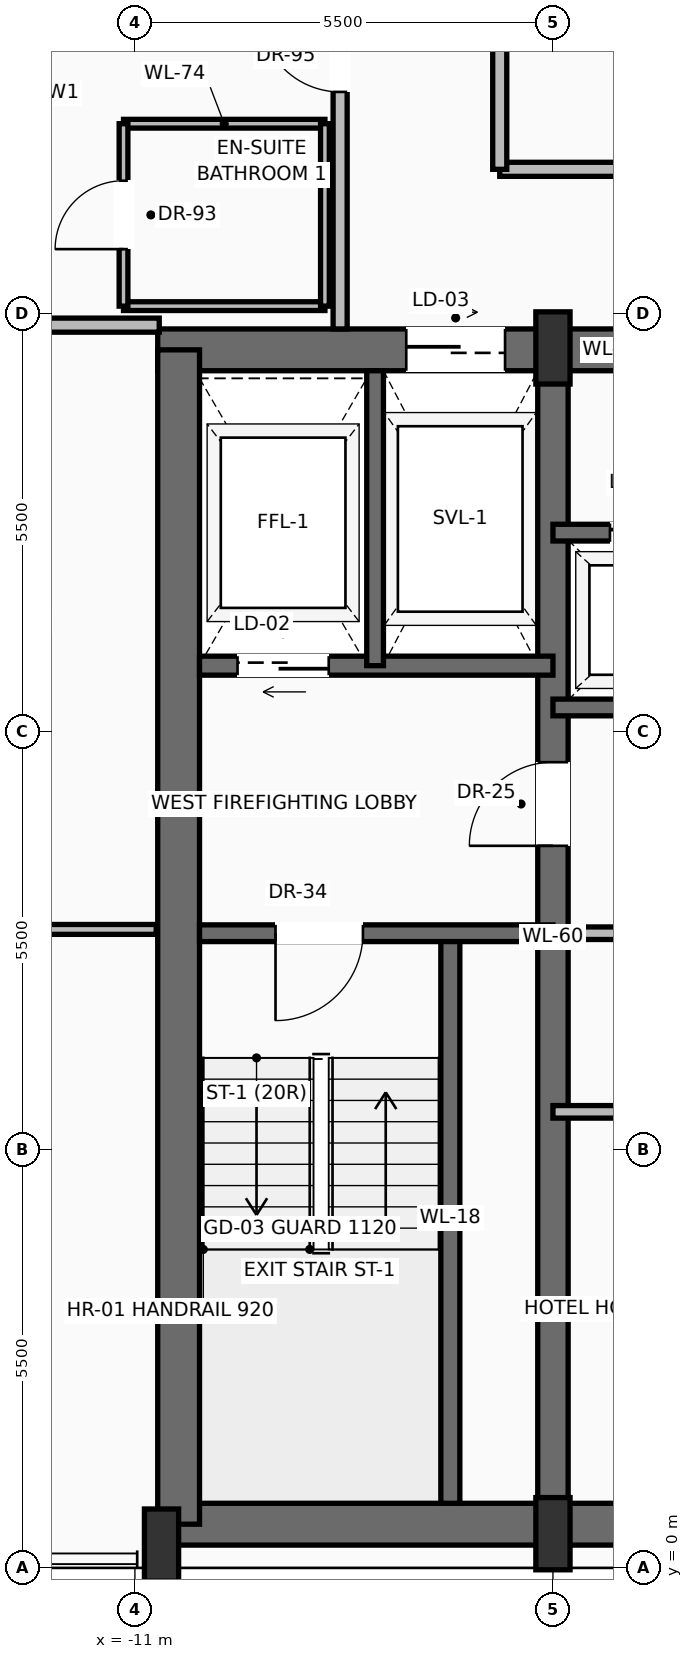
"""IFC4 building model, lengths in metres.
Left out: names, types, materials, properties, quantities, classifications, styles, units other than length and angle.
Written with IfcOpenShell. Run it as: python <this file> out.ifc"""

import sys

from ifc_helpers import new_model, si_unit, direction, frame, frame_2d, origin, origin_2d, place, context, subcontext, project, spatial, rectangle, extrude, source, transform, mapped, element, fill, save


model = new_model("IFC4")
c1 = context("Model", 3, precision=1e-05, world=origin(), true_north=direction((0.0, 1.0)))
c2 = subcontext(c1, "Body", "Model", "MODEL_VIEW")
j1 = project(units=[si_unit("LENGTHUNIT", "METRE"), si_unit("PLANEANGLEUNIT", "RADIAN")], contexts=[c1])
p1 = place(None, origin())
s1 = spatial("IfcSite", under=j1, at=p1, CompositionType="ELEMENT")
p2 = place(p1, origin())
s2 = spatial("IfcBuilding", under=s1, at=p2, CompositionType="ELEMENT")
p3 = place(p2, frame((0.0, 0.0, 251.05)))
s3 = spatial("IfcBuildingStorey", under=s2, at=p3, CompositionType="ELEMENT", Elevation=251.05)
p4 = place(p3, frame((-10.65, 0.575, 0.0), z_axis=(0.0, 0.0, 1.0), x_axis=(1.0, 0.0, 0.0)))
e1 = element("IfcWall", 1, at=p4, inside=s3, PredefinedType="SHEAR", context=c2, shape_type="SweptSolid", body=[
    extrude(rectangle(XDim=21.3, YDim=0.55, at=frame_2d((10.65, 0.0))), origin(), (0.0, 0.0, 1.0), 3.24),
])
p5 = place(p3, frame((-10.7, 16.025, 0.0), z_axis=(0.0, 0.0, 1.0), x_axis=(1.0, 0.0, 0.0)))
e2 = element("IfcWall", 2, at=p5, inside=s3, PredefinedType="SHEAR", context=c2, shape_type="SweptSolid", body=[
    extrude(rectangle(XDim=21.4, YDim=0.55, at=frame_2d((10.7, 0.0))), origin(), (0.0, 0.0, 1.0), 3.24),
])
p6 = place(p5, frame((3.27, 0.0, 0.0)))
e3 = element("IfcOpeningElement", 3, at=p6, cuts=e2, PredefinedType="OPENING", context=c2, shape_type="SweptSolid", body=[
    extrude(rectangle(XDim=1.3, YDim=2.3, at=frame_2d((0.65, 1.15))), frame((0.0, 0.285, 0.0), z_axis=(0.0, -1.0, 0.0), x_axis=(1.0, 0.0, 0.0)), (0.0, 0.0, 1.0), 0.57),
])
p7 = place(p5, frame((9.7, 0.0, 0.0)))
e4 = element("IfcOpeningElement", 4, at=p7, cuts=e2, PredefinedType="OPENING", context=c2, shape_type="SweptSolid", body=[
    extrude(rectangle(XDim=2.0, YDim=2.4, at=frame_2d((1.0, 1.2))), frame((0.0, 0.285, 0.0), z_axis=(0.0, -1.0, 0.0), x_axis=(1.0, 0.0, 0.0)), (0.0, 0.0, 1.0), 0.57),
])
p8 = place(p3, frame((-10.425, 0.575, 0.0), z_axis=(0.0, 0.0, 1.0), x_axis=(0.0, 1.0, 0.0)))
e5 = element("IfcWall", 5, at=p8, inside=s3, PredefinedType="SHEAR", context=c2, shape_type="SweptSolid", body=[
    extrude(rectangle(XDim=15.45, YDim=0.55, at=frame_2d((7.725, 0.0))), origin(), (0.0, 0.0, 1.0), 3.24),
])
p9 = place(p3, frame((-5.5, 0.575, 0.0), z_axis=(0.0, 0.0, 1.0), x_axis=(0.0, 1.0, 0.0)))
e6 = element("IfcWall", 6, at=p9, inside=s3, PredefinedType="SHEAR", context=c2, shape_type="SweptSolid", body=[
    extrude(rectangle(XDim=15.45, YDim=0.4, at=frame_2d((7.725, 0.0))), origin(), (0.0, 0.0, 1.0), 3.24),
])
p10 = place(p9, frame((8.925, 0.0, 0.0)))
e7 = element("IfcOpeningElement", 7, at=p10, cuts=e6, PredefinedType="OPENING", context=c2, shape_type="SweptSolid", body=[
    extrude(rectangle(XDim=1.1, YDim=2.2, at=frame_2d((0.55, 1.1))), frame((0.0, 0.21, 0.0), z_axis=(0.0, -1.0, 0.0), x_axis=(1.0, 0.0, 0.0)), (0.0, 0.0, 1.0), 0.42),
])
m1 = source(origin(), c2, "Body", "SweptSolid", [
    extrude(rectangle(XDim=0.45, YDim=0.95, at=origin_2d()), origin(), (0.0, 0.0, 1.0), 3.45),
])
for number, where, z_axis, x_axis in (
    (8, (-10.65, 0.3, 0.0), (0.0, 0.0, 1.0), (1.0, 0.0, 0.0)),
    (9, (-5.5, 0.45, 0.0), (0.0, 0.0, 1.0), (1.0, 0.0, 0.0)),
    (10, (-5.5, 16.05, 0.0), (0.0, 0.0, 1.0), (1.0, 0.0, 0.0)),
):
    element("IfcColumn", number, at=place(p3, frame(where, z_axis=z_axis, x_axis=x_axis)), inside=s3, PredefinedType="PILASTER", context=c2, shape_type="MappedRepresentation", body=[
        mapped(m1, transform((0.0, 0.0, 0.0), scale=1.0)),
    ])
p11 = place(p3, frame((-19.099, 14.814, 0.0), z_axis=(0.0, 0.0, 1.0), x_axis=(0.505023562938, 0.863105556046, 0.0)))
e11 = element("IfcWall", 11, at=p11, inside=s3, PredefinedType="SOLIDWALL", context=c2, shape_type="SweptSolid", body=[
    extrude(rectangle(XDim=19.748, YDim=0.28, at=frame_2d((9.874, 0.0))), origin(), (0.0, 0.0, 1.0), 2.82),
])
p12 = place(p11, frame((4.74, 0.0, 0.0)))
e12 = element("IfcOpeningElement", 12, at=p12, cuts=e11, PredefinedType="OPENING", context=c2, shape_type="SweptSolid", body=[
    extrude(rectangle(XDim=1.6, YDim=2.35, at=frame_2d((0.8, 1.175))), frame((0.0, 0.15, 0.0), z_axis=(0.0, -1.0, 0.0), x_axis=(1.0, 0.0, 0.0)), (0.0, 0.0, 1.0), 0.3),
])
p13 = place(p11, frame((13.429, 0.0, 0.9)))
e13 = element("IfcOpeningElement", 13, at=p13, cuts=e11, PredefinedType="OPENING", context=c2, shape_type="SweptSolid", body=[
    extrude(rectangle(XDim=1.55, YDim=1.75, at=frame_2d((0.775, 0.875))), frame((0.0, 0.15, 0.0), z_axis=(0.0, -1.0, 0.0), x_axis=(1.0, 0.0, 0.0)), (0.0, 0.0, 1.0), 0.3),
])
p14 = place(p3, frame((-6.85, 0.85, 0.0), z_axis=(0.0, 0.0, 1.0), x_axis=(0.0, 1.0, 0.0)))
e14 = element("IfcWall", 14, at=p14, inside=s3, PredefinedType="SOLIDWALL", context=c2, shape_type="SweptSolid", body=[
    extrude(rectangle(XDim=7.5, YDim=0.25, at=frame_2d((3.75, 0.0))), origin(), (0.0, 0.0, 1.0), 3.24),
])
p15 = place(p3, frame((-5.5, 8.35, 0.0), z_axis=(0.0, 0.0, 1.0), x_axis=(-1.0, 0.0, 0.0)))
e15 = element("IfcWall", 15, at=p15, inside=s3, PredefinedType="SOLIDWALL", context=c2, shape_type="SweptSolid", body=[
    extrude(rectangle(XDim=4.65, YDim=0.22, at=frame_2d((2.325, 0.0))), origin(), (0.0, 0.0, 1.0), 3.24),
])
p16 = place(p15, frame((2.5, 0.0, 0.0)))
e16 = element("IfcOpeningElement", 16, at=p16, cuts=e15, PredefinedType="OPENING", context=c2, shape_type="SweptSolid", body=[
    extrude(rectangle(XDim=1.15, YDim=2.2, at=frame_2d((0.575, 1.1))), frame((0.0, 0.12, 0.0), z_axis=(0.0, -1.0, 0.0), x_axis=(1.0, 0.0, 0.0)), (0.0, 0.0, 1.0), 0.24),
])
p17 = place(p3, frame((-5.5, 11.87, 0.0), z_axis=(0.0, 0.0, 1.0), x_axis=(-1.0, 0.0, 0.0)))
e17 = element("IfcWall", 17, at=p17, inside=s3, PredefinedType="SOLIDWALL", context=c2, shape_type="SweptSolid", body=[
    extrude(rectangle(XDim=4.65, YDim=0.25, at=frame_2d((2.325, 0.0))), origin(), (0.0, 0.0, 1.0), 3.24),
])
p18 = place(p17, frame((2.95, 0.0, 0.0)))
e18 = element("IfcOpeningElement", 18, at=p18, cuts=e17, PredefinedType="OPENING", context=c2, shape_type="SweptSolid", body=[
    extrude(rectangle(XDim=1.2, YDim=2.25, at=frame_2d((0.6, 1.125))), frame((0.0, 0.135, 0.0), z_axis=(0.0, -1.0, 0.0), x_axis=(1.0, 0.0, 0.0)), (0.0, 0.0, 1.0), 0.27),
])
p19 = place(p3, frame((-7.84, 11.87, 0.0), z_axis=(0.0, 0.0, 1.0), x_axis=(0.0, 1.0, 0.0)))
e19 = element("IfcWall", 19, at=p19, inside=s3, PredefinedType="SOLIDWALL", context=c2, shape_type="SweptSolid", body=[
    extrude(rectangle(XDim=3.88, YDim=0.22, at=frame_2d((1.94, 0.0))), origin(), (0.0, 0.0, 1.0), 3.24),
])
p20 = place(p3, frame((-5.5, 6.0, 0.0), z_axis=(0.0, 0.0, 1.0), x_axis=(1.0, 0.0, 0.0)))
e20 = element("IfcWall", 20, at=p20, inside=s3, PredefinedType="PARTITIONING", context=c2, shape_type="SweptSolid", body=[
    extrude(rectangle(XDim=10.8, YDim=0.165, at=frame_2d((5.4, 0.0))), origin(), (0.0, 0.0, 1.0), 3.232),
])
p21 = place(p20, frame((7.7, 0.0, 0.0)))
e21 = element("IfcOpeningElement", 21, at=p21, cuts=e20, PredefinedType="OPENING", context=c2, shape_type="SweptSolid", body=[
    extrude(rectangle(XDim=0.9, YDim=2.1, at=frame_2d((0.45, 1.05))), frame((0.0, 0.093, 0.0), z_axis=(0.0, -1.0, 0.0), x_axis=(1.0, 0.0, 0.0)), (0.0, 0.0, 1.0), 0.185),
])
p22 = place(p3, frame((-5.3, 8.35, 0.0), z_axis=(0.0, 0.0, 1.0), x_axis=(1.0, 0.0, 0.0)))
e22 = element("IfcWall", 22, at=p22, inside=s3, PredefinedType="PARTITIONING", context=c2, shape_type="SweptSolid", body=[
    extrude(rectangle(XDim=7.12, YDim=0.165, at=frame_2d((3.56, 0.0))), origin(), (0.0, 0.0, 1.0), 3.232),
])
p23 = place(p22, frame((0.85, 0.0, 0.0)))
e23 = element("IfcOpeningElement", 23, at=p23, cuts=e22, PredefinedType="OPENING", context=c2, shape_type="SweptSolid", body=[
    extrude(rectangle(XDim=0.9, YDim=2.1, at=frame_2d((0.45, 1.05))), frame((0.0, 0.093, 0.0), z_axis=(0.0, -1.0, 0.0), x_axis=(1.0, 0.0, 0.0)), (0.0, 0.0, 1.0), 0.185),
])
p24 = place(p22, frame((5.65, 0.0, 0.0)))
e24 = element("IfcOpeningElement", 24, at=p24, cuts=e22, PredefinedType="OPENING", context=c2, shape_type="SweptSolid", body=[
    extrude(rectangle(XDim=0.9, YDim=2.1, at=frame_2d((0.45, 1.05))), frame((0.0, 0.093, 0.0), z_axis=(0.0, -1.0, 0.0), x_axis=(1.0, 0.0, 0.0)), (0.0, 0.0, 1.0), 0.185),
])
p25 = place(p3, frame((-5.5, 11.32, 0.0), z_axis=(0.0, 0.0, 1.0), x_axis=(1.0, 0.0, 0.0)))
e25 = element("IfcWall", 25, at=p25, inside=s3, PredefinedType="SOLIDWALL", context=c2, shape_type="SweptSolid", body=[
    extrude(rectangle(XDim=7.32, YDim=0.22, at=frame_2d((3.66, 0.0))), origin(), (0.0, 0.0, 1.0), 3.24),
])
p26 = place(p3, frame((-5.5, 13.62, 0.0), z_axis=(0.0, 0.0, 1.0), x_axis=(1.0, 0.0, 0.0)))
e26 = element("IfcWall", 26, at=p26, inside=s3, PredefinedType="SOLIDWALL", context=c2, shape_type="SweptSolid", body=[
    extrude(rectangle(XDim=7.32, YDim=0.22, at=frame_2d((3.66, 0.0))), origin(), (0.0, 0.0, 1.0), 3.24),
])
p27 = place(p26, frame((0.75, 0.0, 0.0)))
e27 = element("IfcOpeningElement", 27, at=p27, cuts=e26, PredefinedType="OPENING", context=c2, shape_type="SweptSolid", body=[
    extrude(rectangle(XDim=1.1, YDim=2.2, at=frame_2d((0.55, 1.1))), frame((0.0, 0.12, 0.0), z_axis=(0.0, -1.0, 0.0), x_axis=(1.0, 0.0, 0.0)), (0.0, 0.0, 1.0), 0.24),
])
p28 = place(p26, frame((3.15, 0.0, 0.0)))
e28 = element("IfcOpeningElement", 28, at=p28, cuts=e26, PredefinedType="OPENING", context=c2, shape_type="SweptSolid", body=[
    extrude(rectangle(XDim=1.1, YDim=2.2, at=frame_2d((0.55, 1.1))), frame((0.0, 0.12, 0.0), z_axis=(0.0, -1.0, 0.0), x_axis=(1.0, 0.0, 0.0)), (0.0, 0.0, 1.0), 0.24),
])
p29 = place(p26, frame((5.55, 0.0, 0.0)))
e29 = element("IfcOpeningElement", 29, at=p29, cuts=e26, PredefinedType="OPENING", context=c2, shape_type="SweptSolid", body=[
    extrude(rectangle(XDim=1.1, YDim=2.2, at=frame_2d((0.55, 1.1))), frame((0.0, 0.12, 0.0), z_axis=(0.0, -1.0, 0.0), x_axis=(1.0, 0.0, 0.0)), (0.0, 0.0, 1.0), 0.24),
])
p30 = place(p3, frame((-6.2, 18.4, 0.0), z_axis=(0.0, 0.0, 1.0), x_axis=(1.0, 0.0, 0.0)))
e30 = element("IfcWall", 30, at=p30, inside=s3, PredefinedType="PARTITIONING", context=c2, shape_type="SweptSolid", body=[
    extrude(rectangle(XDim=12.6, YDim=0.185, at=frame_2d((6.3, 0.0))), origin(), (0.0, 0.0, 1.0), 3.232),
])
p31 = place(p30, frame((5.825, 0.0, 0.0)))
e31 = element("IfcOpeningElement", 31, at=p31, cuts=e30, PredefinedType="OPENING", context=c2, shape_type="SweptSolid", body=[
    extrude(rectangle(XDim=0.95, YDim=2.2, at=frame_2d((0.475, 1.1))), frame((0.0, 0.103, 0.0), z_axis=(0.0, -1.0, 0.0), x_axis=(1.0, 0.0, 0.0)), (0.0, 0.0, 1.0), 0.205),
])
p32 = place(p3, frame((-6.2, 18.4, 0.0), z_axis=(0.0, 0.0, 1.0), x_axis=(0.0, 1.0, 0.0)))
e32 = element("IfcWall", 32, at=p32, inside=s3, PredefinedType="PARTITIONING", context=c2, shape_type="SweptSolid", body=[
    extrude(rectangle(XDim=7.9, YDim=0.185, at=frame_2d((3.95, 0.0))), origin(), (0.0, 0.0, 1.0), 3.232),
])
p33 = place(p3, frame((-8.3, 16.3, 0.0), z_axis=(0.0, 0.0, 1.0), x_axis=(0.0, 1.0, 0.0)))
e33 = element("IfcWall", 33, at=p33, inside=s3, PredefinedType="PARTITIONING", context=c2, shape_type="SweptSolid", body=[
    extrude(rectangle(XDim=12.1, YDim=0.185, at=frame_2d((6.05, 0.0))), origin(), (0.0, 0.0, 1.0), 3.232),
])
p34 = place(p33, frame((3.118, 0.0, 0.0)))
e34 = element("IfcOpeningElement", 34, at=p34, cuts=e33, PredefinedType="OPENING", context=c2, shape_type="SweptSolid", body=[
    extrude(rectangle(XDim=1.05, YDim=2.25, at=frame_2d((0.525, 1.125))), frame((0.0, 0.103, 0.0), z_axis=(0.0, -1.0, 0.0), x_axis=(1.0, 0.0, 0.0)), (0.0, 0.0, 1.0), 0.205),
])
p35 = place(p33, frame((7.696, 0.0, 0.0)))
e35 = element("IfcOpeningElement", 35, at=p35, cuts=e33, PredefinedType="OPENING", context=c2, shape_type="SweptSolid", body=[
    extrude(rectangle(XDim=1.05, YDim=2.25, at=frame_2d((0.525, 1.125))), frame((0.0, 0.103, 0.0), z_axis=(0.0, -1.0, 0.0), x_axis=(1.0, 0.0, 0.0)), (0.0, 0.0, 1.0), 0.205),
])
p36 = place(p3, frame((-18.352, 16.35, 0.0), z_axis=(0.0, 0.0, 1.0), x_axis=(1.0, 0.0, 0.0)))
e36 = element("IfcWall", 36, at=p36, inside=s3, PredefinedType="PARTITIONING", context=c2, shape_type="SweptSolid", body=[
    extrude(rectangle(XDim=7.672, YDim=0.185, at=frame_2d((3.836, 0.0))), origin(), (0.0, 0.0, 1.0), 3.232),
])
p37 = place(p36, frame((4.36, 0.0, 0.0)))
e37 = element("IfcOpeningElement", 37, at=p37, cuts=e36, PredefinedType="OPENING", context=c2, shape_type="SweptSolid", body=[
    extrude(rectangle(XDim=1.05, YDim=2.25, at=frame_2d((0.525, 1.125))), frame((0.0, 0.103, 0.0), z_axis=(0.0, -1.0, 0.0), x_axis=(1.0, 0.0, 0.0)), (0.0, 0.0, 1.0), 0.205),
])
p38 = place(p3, frame((-23.003, 8.4, 0.0), z_axis=(0.0, 0.0, 1.0), x_axis=(1.0, 0.0, 0.0)))
e38 = element("IfcWall", 38, at=p38, inside=s3, PredefinedType="PARTITIONING", context=c2, shape_type="SweptSolid", body=[
    extrude(rectangle(XDim=12.283, YDim=0.13, at=frame_2d((6.142, 0.0))), origin(), (0.0, 0.0, 1.0), 3.232),
])
p39 = place(p38, frame((5.086, 0.0, 0.0)))
e39 = element("IfcOpeningElement", 39, at=p39, cuts=e38, PredefinedType="OPENING", context=c2, shape_type="SweptSolid", body=[
    extrude(rectangle(XDim=0.95, YDim=2.2, at=frame_2d((0.475, 1.1))), frame((0.0, 0.075, 0.0), z_axis=(0.0, -1.0, 0.0), x_axis=(1.0, 0.0, 0.0)), (0.0, 0.0, 1.0), 0.15),
])
for number, where, z_axis, x_axis in (
    (40, (-11.15, 16.6, 0.0), (0.0, 0.0, 1.0), (1.0, 0.0, 0.0)),
    (41, (-11.15, 19.0, 0.0), (0.0, 0.0, 1.0), (1.0, 0.0, 0.0)),
):
    element("IfcWall", number, at=place(p3, frame(where, z_axis=z_axis, x_axis=x_axis)), inside=s3, PredefinedType="PARTITIONING", context=c2, shape_type="SweptSolid", body=[
        extrude(rectangle(XDim=2.65, YDim=0.115, at=frame_2d((1.325, 0.0))), origin(), (0.0, 0.0, 1.0), 3.232),
    ])
p40 = place(p3, frame((-11.15, 16.6, 0.0), z_axis=(0.0, 0.0, 1.0), x_axis=(0.0, 1.0, 0.0)))
e42 = element("IfcWall", 42, at=p40, inside=s3, PredefinedType="PARTITIONING", context=c2, shape_type="SweptSolid", body=[
    extrude(rectangle(XDim=2.4, YDim=0.115, at=frame_2d((1.2, 0.0))), origin(), (0.0, 0.0, 1.0), 3.232),
])
p41 = place(p40, frame((0.75, 0.0, 0.0)))
e43 = element("IfcOpeningElement", 43, at=p41, cuts=e42, PredefinedType="OPENING", context=c2, shape_type="SweptSolid", body=[
    extrude(rectangle(XDim=0.9, YDim=2.15, at=frame_2d((0.45, 1.075))), frame((0.0, 0.067, 0.0), z_axis=(0.0, -1.0, 0.0), x_axis=(1.0, 0.0, 0.0)), (0.0, 0.0, 1.0), 0.135),
])
p42 = place(p3, frame((-8.5, 16.6, 0.0), z_axis=(0.0, 0.0, 1.0), x_axis=(0.0, 1.0, 0.0)))
e44 = element("IfcWall", 44, at=p42, inside=s3, PredefinedType="PARTITIONING", context=c2, shape_type="SweptSolid", body=[
    extrude(rectangle(XDim=2.4, YDim=0.115, at=frame_2d((1.2, 0.0))), origin(), (0.0, 0.0, 1.0), 3.232),
])
m2 = source(origin(), c2, "Body", "SweptSolid", [
    extrude(rectangle(XDim=1.15, YDim=2.2, at=frame_2d((0.575, 1.1))), frame((0.0, 0.025, 0.0), z_axis=(0.0, -1.0, 0.0), x_axis=(1.0, 0.0, 0.0)), (0.0, 0.0, 1.0), 0.05),
])
p43 = place(p16, origin())
e45 = element("IfcDoor", 45, at=p43, inside=s3, OperationType="SINGLE_SWING_RIGHT", PredefinedType="DOOR", context=c2, shape_type="MappedRepresentation", body=[
    mapped(m2, transform((0.0, 0.0, 0.0), scale=1.0)),
])
fill(e16, e45)
m3 = source(origin(), c2, "Body", "SweptSolid", [
    extrude(rectangle(XDim=1.1, YDim=2.2, at=frame_2d((0.55, 1.1))), frame((0.0, 0.025, 0.0), z_axis=(0.0, -1.0, 0.0), x_axis=(1.0, 0.0, 0.0)), (0.0, 0.0, 1.0), 0.05),
])
p44 = place(p10, origin())
e46 = element("IfcDoor", 46, at=p44, inside=s3, OperationType="SINGLE_SWING_LEFT", PredefinedType="DOOR", context=c2, shape_type="MappedRepresentation", body=[
    mapped(m3, transform((0.0, 0.0, 0.0), scale=1.0)),
])
fill(e7, e46)
m4 = source(origin(), c2, "Body", "SweptSolid", [
    extrude(rectangle(XDim=1.2, YDim=2.25, at=frame_2d((0.6, 1.125))), frame((0.0, 0.025, 0.0), z_axis=(0.0, -1.0, 0.0), x_axis=(1.0, 0.0, 0.0)), (0.0, 0.0, 1.0), 0.05),
])
p45 = place(p18, origin())
e47 = element("IfcDoor", 47, at=p45, inside=s3, OperationType="SLIDING_TO_LEFT", PredefinedType="DOOR", context=c2, shape_type="MappedRepresentation", body=[
    mapped(m4, transform((0.0, 0.0, 0.0), scale=1.0)),
])
fill(e18, e47)
m5 = source(origin(), c2, "Body", "SweptSolid", [
    extrude(rectangle(XDim=1.3, YDim=2.3, at=frame_2d((0.65, 1.15))), frame((0.0, 0.025, 0.0), z_axis=(0.0, -1.0, 0.0), x_axis=(1.0, 0.0, 0.0)), (0.0, 0.0, 1.0), 0.05),
])
p46 = place(p6, origin())
e48 = element("IfcDoor", 48, at=p46, inside=s3, OperationType="SLIDING_TO_RIGHT", PredefinedType="DOOR", context=c2, shape_type="MappedRepresentation", body=[
    mapped(m5, transform((0.0, 0.0, 0.0), scale=1.0)),
])
fill(e3, e48)
m6 = source(origin(), c2, "Body", "SweptSolid", [
    extrude(rectangle(XDim=1.1, YDim=2.2, at=frame_2d((0.55, 1.1))), frame((0.0, 0.025, 0.0), z_axis=(0.0, -1.0, 0.0), x_axis=(1.0, 0.0, 0.0)), (0.0, 0.0, 1.0), 0.05),
])
p47 = place(p27, origin())
e49 = element("IfcDoor", 49, at=p47, inside=s3, OperationType="SLIDING_TO_RIGHT", PredefinedType="DOOR", context=c2, shape_type="MappedRepresentation", body=[
    mapped(m6, transform((0.0, 0.0, 0.0), scale=1.0)),
])
fill(e27, e49)
m7 = source(origin(), c2, "Body", "SweptSolid", [
    extrude(rectangle(XDim=1.05, YDim=2.25, at=frame_2d((0.525, 1.125))), frame((0.0, 0.025, 0.0), z_axis=(0.0, -1.0, 0.0), x_axis=(1.0, 0.0, 0.0)), (0.0, 0.0, 1.0), 0.05),
])
p48 = place(p34, origin())
e50 = element("IfcDoor", 50, at=p48, inside=s3, OperationType="SINGLE_SWING_RIGHT", PredefinedType="DOOR", context=c2, shape_type="MappedRepresentation", body=[
    mapped(m7, transform((0.0, 0.0, 0.0), scale=1.0)),
])
fill(e34, e50)
m8 = source(origin(), c2, "Body", "SweptSolid", [
    extrude(rectangle(XDim=0.9, YDim=2.15, at=frame_2d((0.45, 1.075))), frame((0.0, 0.025, 0.0), z_axis=(0.0, -1.0, 0.0), x_axis=(1.0, 0.0, 0.0)), (0.0, 0.0, 1.0), 0.05),
])
p49 = place(p41, origin())
e51 = element("IfcDoor", 51, at=p49, inside=s3, OperationType="SINGLE_SWING_LEFT", PredefinedType="DOOR", context=c2, shape_type="MappedRepresentation", body=[
    mapped(m8, transform((0.0, 0.0, 0.0), scale=1.0)),
])
fill(e43, e51)
save(model, sys.argv[1])
